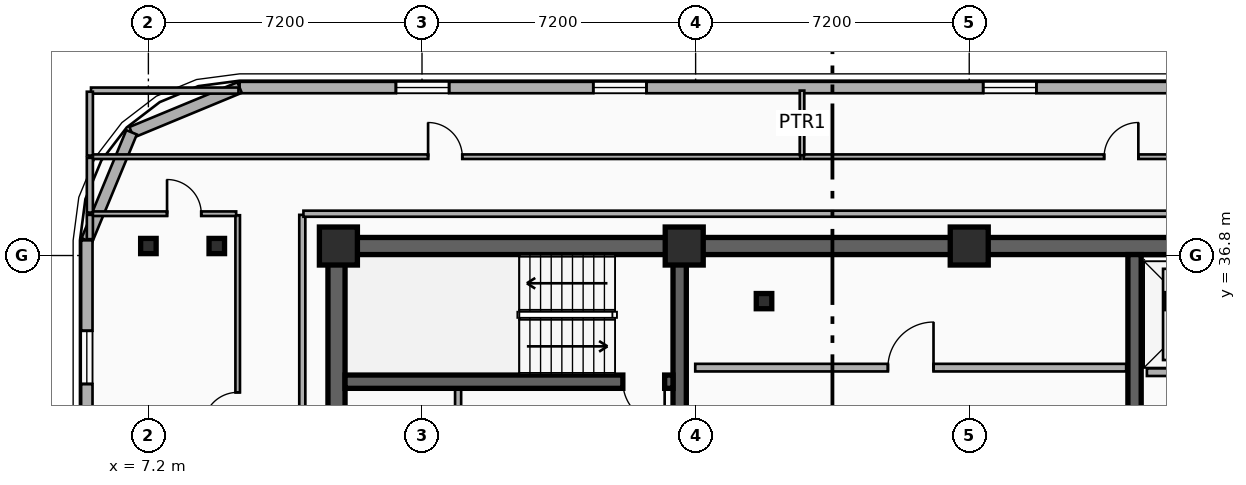
"""IFC4 building model, lengths in metres.
Left out: names, types, materials, properties, quantities, classifications, styles, units other than length and angle.
Written with IfcOpenShell. Run it as: python <this file> out.ifc"""

import sys

from ifc_helpers import new_model, si_unit, direction, frame, frame_2d, origin, origin_2d, place, context, subcontext, project, spatial, rectangle, i_section, extrude, element, fill, save


model = new_model("IFC4")
c1 = context("Model", 3, precision=1e-05, world=origin(), true_north=direction((0.0, 1.0)))
c2 = subcontext(c1, "Body", "Model", "MODEL_VIEW")
j1 = project(units=[si_unit("LENGTHUNIT", "METRE"), si_unit("PLANEANGLEUNIT", "RADIAN")], contexts=[c1])
p1 = place(None, origin())
s1 = spatial("IfcSite", under=j1, at=p1, CompositionType="ELEMENT")
p2 = place(p1, origin())
s2 = spatial("IfcBuilding", under=s1, at=p2, CompositionType="ELEMENT")
p3 = place(p2, frame((0.0, 0.0, 204.0)))
s3 = spatial("IfcBuildingStorey", under=s2, at=p3, CompositionType="ELEMENT", Elevation=204.0)
p4 = place(p3, frame((12.15, 37.05, 0.0), z_axis=(0.0, 0.0, 1.0), x_axis=(1.0, 0.0, 0.0)))
e1 = element("IfcWall", 1, at=p4, inside=s3, PredefinedType="SHEAR", context=c2, shape_type="SweptSolid", body=[
    extrude(rectangle(XDim=33.23, YDim=0.45, at=frame_2d((16.615, 0.0))), origin(), (0.0, 0.0, 1.0), 3.6),
])
p5 = place(p3, frame((12.15, 28.045, 0.0), z_axis=(0.0, 0.0, 1.0), x_axis=(0.0, 1.0, 0.0)))
e2 = element("IfcWall", 2, at=p5, inside=s3, PredefinedType="SHEAR", context=c2, shape_type="SweptSolid", body=[
    extrude(rectangle(XDim=8.78, YDim=0.45, at=frame_2d((4.39, 0.0))), origin(), (0.0, 0.0, 1.0), 3.6),
])
for number, where, z_axis, x_axis in (
    (3, (21.18, 28.045, 0.0), (0.0, 0.0, 1.0), (0.0, 1.0, 0.0)),
    (4, (33.15, 28.045, 0.0), (0.0, 0.0, 1.0), (0.0, 1.0, 0.0)),
):
    element("IfcWall", number, at=place(p3, frame(where, z_axis=z_axis, x_axis=x_axis)), inside=s3, PredefinedType="SHEAR", context=c2, shape_type="SweptSolid", body=[
        extrude(rectangle(XDim=8.78, YDim=0.35, at=frame_2d((4.39, 0.0))), origin(), (0.0, 0.0, 1.0), 3.6),
    ])
p6 = place(p3, frame((21.005, 33.48, 0.0), z_axis=(0.0, 0.0, 1.0), x_axis=(-1.0, 0.0, 0.0)))
e5 = element("IfcWall", 5, at=p6, inside=s3, PredefinedType="SHEAR", context=c2, shape_type="SweptSolid", body=[
    extrude(rectangle(XDim=8.63, YDim=0.35, at=frame_2d((4.315, 0.0))), origin(), (0.0, 0.0, 1.0), 3.6),
])
p7 = place(p6, frame((0.22, 0.0, 0.0)))
e6 = element("IfcOpeningElement", 6, at=p7, cuts=e5, PredefinedType="OPENING", context=c2, shape_type="SweptSolid", body=[
    extrude(rectangle(XDim=1.1, YDim=2.15, at=frame_2d((0.55, 1.075))), frame((0.0, 0.185, 0.0), z_axis=(0.0, -1.0, 0.0), x_axis=(1.0, 0.0, 0.0)), (0.0, 0.0, 1.0), 0.37),
])
p8 = place(p3, frame((23.4, 35.6, 0.0), z_axis=(0.0, 0.0, 1.0), x_axis=(1.0, 0.0, 0.0)))
e7 = element("IfcColumn", 7, at=p8, inside=s3, PredefinedType="COLUMN", context=c2, shape_type="SweptSolid", body=[
    extrude(i_section(OverallWidth=0.408, OverallDepth=0.4, WebThickness=0.025, FlangeThickness=0.039, FilletRadius=0.015, at=origin_2d()), origin(), (0.0, 0.0, 1.0), 3.6),
])
for number, where, z_axis, x_axis in (
    (8, (12.2, 37.05, 0.0), (0.0, 0.0, 1.0), (1.0, 0.0, 0.0)),
    (9, (21.3, 37.05, 0.0), (0.0, 0.0, 1.0), (1.0, 0.0, 0.0)),
    (10, (28.8, 37.05, 0.0), (0.0, 0.0, 1.0), (1.0, 0.0, 0.0)),
):
    element("IfcColumn", number, at=place(p3, frame(where, z_axis=z_axis, x_axis=x_axis)), inside=s3, PredefinedType="COLUMN", context=c2, shape_type="SweptSolid", body=[
        extrude(rectangle(XDim=1.0, YDim=1.0, at=origin_2d()), origin(), (0.0, 0.0, 1.0), 3.6),
    ])
for number, where, z_axis, x_axis in (
    (11, (9.0, 37.05, 0.0), (0.0, 0.0, 1.0), (1.0, 0.0, 0.0)),
    (12, (7.2, 37.05, 0.0), (0.0, 0.0, 1.0), (1.0, 0.0, 0.0)),
):
    element("IfcColumn", number, at=place(p3, frame(where, z_axis=z_axis, x_axis=x_axis)), inside=s3, PredefinedType="COLUMN", context=c2, shape_type="SweptSolid", body=[
        extrude(i_section(OverallWidth=0.408, OverallDepth=0.4, WebThickness=0.025, FlangeThickness=0.039, FilletRadius=0.015, at=origin_2d()), origin(), (0.0, 0.0, 1.0), 3.6),
    ])
p9 = place(p3, frame((9.6, 41.22, 0.0), z_axis=(0.0, 0.0, 1.0), x_axis=(1.0, 0.0, 0.0)))
e13 = element("IfcWall", 13, at=p9, inside=s3, PredefinedType="SOLIDWALL", context=c2, shape_type="SweptSolid", body=[
    extrude(rectangle(XDim=38.4, YDim=0.3, at=frame_2d((19.2, 0.0))), origin(), (0.0, 0.0, 1.0), 3.34),
])
p10 = place(p9, frame((4.113, 0.0, 0.75)))
e14 = element("IfcOpeningElement", 14, at=p10, cuts=e13, PredefinedType="OPENING", context=c2, shape_type="SweptSolid", body=[
    extrude(rectangle(XDim=1.4, YDim=2.1, at=frame_2d((0.7, 1.05))), frame((0.0, 0.16, 0.0), z_axis=(0.0, -1.0, 0.0), x_axis=(1.0, 0.0, 0.0)), (0.0, 0.0, 1.0), 0.32),
])
p11 = place(p9, frame((9.307, 0.0, 0.75)))
e15 = element("IfcOpeningElement", 15, at=p11, cuts=e13, PredefinedType="OPENING", context=c2, shape_type="SweptSolid", body=[
    extrude(rectangle(XDim=1.4, YDim=2.1, at=frame_2d((0.7, 1.05))), frame((0.0, 0.16, 0.0), z_axis=(0.0, -1.0, 0.0), x_axis=(1.0, 0.0, 0.0)), (0.0, 0.0, 1.0), 0.32),
])
p12 = place(p9, frame((19.567, 0.0, 0.75)))
e16 = element("IfcOpeningElement", 16, at=p12, cuts=e13, PredefinedType="OPENING", context=c2, shape_type="SweptSolid", body=[
    extrude(rectangle(XDim=1.4, YDim=2.1, at=frame_2d((0.7, 1.05))), frame((0.0, 0.16, 0.0), z_axis=(0.0, -1.0, 0.0), x_axis=(1.0, 0.0, 0.0)), (0.0, 0.0, 1.0), 0.32),
])
p13 = place(p9, frame((25.433, 0.0, 0.75)))
e17 = element("IfcOpeningElement", 17, at=p13, cuts=e13, PredefinedType="OPENING", context=c2, shape_type="SweptSolid", body=[
    extrude(rectangle(XDim=1.4, YDim=2.1, at=frame_2d((0.7, 1.05))), frame((0.0, 0.16, 0.0), z_axis=(0.0, -1.0, 0.0), x_axis=(1.0, 0.0, 0.0)), (0.0, 0.0, 1.0), 0.32),
])
p14 = place(p3, frame((6.757, 40.042, 0.0), z_axis=(0.0, 0.0, 1.0), x_axis=(0.923882414032, 0.382676475685, 0.0)))
e18 = element("IfcWall", 18, at=p14, inside=s3, PredefinedType="SOLIDWALL", context=c2, shape_type="SweptSolid", body=[
    extrude(rectangle(XDim=3.077, YDim=0.3, at=frame_2d((1.539, 0.0))), origin(), (0.0, 0.0, 1.0), 3.34),
])
p15 = place(p3, frame((5.58, 37.2, 0.0), z_axis=(0.0, 0.0, 1.0), x_axis=(0.382636798336, 0.92389884758, 0.0)))
e19 = element("IfcWall", 19, at=p15, inside=s3, PredefinedType="SOLIDWALL", context=c2, shape_type="SweptSolid", body=[
    extrude(rectangle(XDim=3.077, YDim=0.3, at=frame_2d((1.538, 0.0))), origin(), (0.0, 0.0, 1.0), 3.34),
])
p16 = place(p3, frame((5.58, 8.6, 0.0), z_axis=(0.0, 0.0, 1.0), x_axis=(0.0, 1.0, 0.0)))
e20 = element("IfcWall", 20, at=p16, inside=s3, PredefinedType="SOLIDWALL", context=c2, shape_type="SweptSolid", body=[
    extrude(rectangle(XDim=28.6, YDim=0.3, at=frame_2d((14.3, 0.0))), origin(), (0.0, 0.0, 1.0), 3.34),
])
p17 = place(p16, frame((21.36, 0.0, 0.34)))
e21 = element("IfcOpeningElement", 21, at=p17, cuts=e20, PredefinedType="OPENING", context=c2, shape_type="SweptSolid", body=[
    extrude(rectangle(XDim=1.4, YDim=2.1, at=frame_2d((0.7, 1.05))), frame((0.0, 0.16, 0.0), z_axis=(0.0, -1.0, 0.0), x_axis=(1.0, 0.0, 0.0)), (0.0, 0.0, 1.0), 0.32),
])
p18 = place(p16, frame((24.82, 0.0, 0.34)))
e22 = element("IfcOpeningElement", 22, at=p18, cuts=e20, PredefinedType="OPENING", context=c2, shape_type="SweptSolid", body=[
    extrude(rectangle(XDim=1.4, YDim=2.1, at=frame_2d((0.7, 1.05))), frame((0.0, 0.16, 0.0), z_axis=(0.0, -1.0, 0.0), x_axis=(1.0, 0.0, 0.0)), (0.0, 0.0, 1.0), 0.32),
])
p19 = place(p16, frame((4.797, 0.0, 0.34)))
e23 = element("IfcOpeningElement", 23, at=p19, cuts=e20, PredefinedType="OPENING", context=c2, shape_type="SweptSolid", body=[
    extrude(rectangle(XDim=1.4, YDim=2.1, at=frame_2d((0.7, 1.05))), frame((0.0, 0.16, 0.0), z_axis=(0.0, -1.0, 0.0), x_axis=(1.0, 0.0, 0.0)), (0.0, 0.0, 1.0), 0.32),
])
p20 = place(p16, frame((10.673, 0.0, 0.34)))
e24 = element("IfcOpeningElement", 24, at=p20, cuts=e20, PredefinedType="OPENING", context=c2, shape_type="SweptSolid", body=[
    extrude(rectangle(XDim=1.4, YDim=2.1, at=frame_2d((0.7, 1.05))), frame((0.0, 0.16, 0.0), z_axis=(0.0, -1.0, 0.0), x_axis=(1.0, 0.0, 0.0)), (0.0, 0.0, 1.0), 0.32),
])
p21 = place(p3, frame((33.475, 33.73, 0.0), z_axis=(0.0, 0.0, 1.0), x_axis=(1.0, 0.0, 0.0)))
e25 = element("IfcWall", 25, at=p21, inside=s3, PredefinedType="PARTITIONING", context=c2, shape_type="SweptSolid", body=[
    extrude(rectangle(XDim=2.725, YDim=0.2, at=frame_2d((1.362, 0.0))), origin(), (0.0, 0.0, 1.0), 2.41),
])
p22 = place(p21, frame((0.812, 0.0, 0.0)))
e26 = element("IfcOpeningElement", 26, at=p22, cuts=e25, PredefinedType="OPENING", context=c2, shape_type="SweptSolid", body=[
    extrude(rectangle(XDim=1.1, YDim=2.15, at=frame_2d((0.55, 1.075))), frame((0.0, 0.11, 0.0), z_axis=(0.0, -1.0, 0.0), x_axis=(1.0, 0.0, 0.0)), (0.0, 0.0, 1.0), 0.22),
])
p23 = place(p3, frame((21.59, 33.85, 0.0), z_axis=(0.0, 0.0, 1.0), x_axis=(1.0, 0.0, 0.0)))
e27 = element("IfcWall", 27, at=p23, inside=s3, PredefinedType="PARTITIONING", context=c2, shape_type="SweptSolid", body=[
    extrude(rectangle(XDim=11.34, YDim=0.2, at=frame_2d((5.67, 0.0))), origin(), (0.0, 0.0, 1.0), 2.41),
])
p24 = place(p23, frame((5.07, 0.0, 0.0)))
e28 = element("IfcOpeningElement", 28, at=p24, cuts=e27, PredefinedType="OPENING", context=c2, shape_type="SweptSolid", body=[
    extrude(rectangle(XDim=1.2, YDim=2.15, at=frame_2d((0.6, 1.075))), frame((0.0, 0.11, 0.0), z_axis=(0.0, -1.0, 0.0), x_axis=(1.0, 0.0, 0.0)), (0.0, 0.0, 1.0), 0.22),
])
p25 = place(p3, frame((9.55, 27.64, 0.0), z_axis=(0.0, 0.0, 1.0), x_axis=(0.0, 1.0, 0.0)))
e29 = element("IfcWall", 29, at=p25, inside=s3, PredefinedType="PARTITIONING", context=c2, shape_type="SweptSolid", body=[
    extrude(rectangle(XDim=10.22, YDim=0.12, at=frame_2d((5.11, 0.0))), origin(), (0.0, 0.0, 1.0), 2.82),
])
p26 = place(p25, frame((4.66, 0.0, 0.0)))
e30 = element("IfcOpeningElement", 30, at=p26, cuts=e29, PredefinedType="OPENING", context=c2, shape_type="SweptSolid", body=[
    extrude(rectangle(XDim=0.9, YDim=2.1, at=frame_2d((0.45, 1.05))), frame((0.0, 0.07, 0.0), z_axis=(0.0, -1.0, 0.0), x_axis=(1.0, 0.0, 0.0)), (0.0, 0.0, 1.0), 0.14),
])
p27 = place(p3, frame((5.66, 37.9, 0.0), z_axis=(0.0, 0.0, 1.0), x_axis=(1.0, 0.0, 0.0)))
e31 = element("IfcWall", 31, at=p27, inside=s3, PredefinedType="PARTITIONING", context=c2, shape_type="SweptSolid", body=[
    extrude(rectangle(XDim=3.85, YDim=0.12, at=frame_2d((1.925, 0.0))), origin(), (0.0, 0.0, 1.0), 3.34),
])
p28 = place(p27, frame((2.031, 0.0, 0.0)))
e32 = element("IfcOpeningElement", 32, at=p28, cuts=e31, PredefinedType="OPENING", context=c2, shape_type="SweptSolid", body=[
    extrude(rectangle(XDim=0.9, YDim=2.1, at=frame_2d((0.45, 1.05))), frame((0.0, 0.07, 0.0), z_axis=(0.0, -1.0, 0.0), x_axis=(1.0, 0.0, 0.0)), (0.0, 0.0, 1.0), 0.14),
])
p29 = place(p3, frame((5.66, 39.4, 0.0), z_axis=(0.0, 0.0, 1.0), x_axis=(1.0, 0.0, 0.0)))
e33 = element("IfcWall", 33, at=p29, inside=s3, PredefinedType="PARTITIONING", context=c2, shape_type="SweptSolid", body=[
    extrude(rectangle(XDim=18.7, YDim=0.12, at=frame_2d((9.35, 0.0))), origin(), (0.0, 0.0, 1.0), 3.34),
])
p30 = place(p29, frame((8.9, 0.0, 0.0)))
e34 = element("IfcOpeningElement", 34, at=p30, cuts=e33, PredefinedType="OPENING", context=c2, shape_type="SweptSolid", body=[
    extrude(rectangle(XDim=0.9, YDim=2.1, at=frame_2d((0.45, 1.05))), frame((0.0, 0.07, 0.0), z_axis=(0.0, -1.0, 0.0), x_axis=(1.0, 0.0, 0.0)), (0.0, 0.0, 1.0), 0.14),
])
p31 = place(p3, frame((24.44, 39.4, 0.0), z_axis=(0.0, 0.0, 1.0), x_axis=(1.0, 0.0, 0.0)))
e35 = element("IfcWall", 35, at=p31, inside=s3, PredefinedType="PARTITIONING", context=c2, shape_type="SweptSolid", body=[
    extrude(rectangle(XDim=16.72, YDim=0.12, at=frame_2d((8.36, 0.0))), origin(), (0.0, 0.0, 1.0), 3.34),
])
p32 = place(p31, frame((7.91, 0.0, 0.0)))
e36 = element("IfcOpeningElement", 36, at=p32, cuts=e35, PredefinedType="OPENING", context=c2, shape_type="SweptSolid", body=[
    extrude(rectangle(XDim=0.9, YDim=2.1, at=frame_2d((0.45, 1.05))), frame((0.0, 0.07, 0.0), z_axis=(0.0, -1.0, 0.0), x_axis=(1.0, 0.0, 0.0)), (0.0, 0.0, 1.0), 0.14),
])
p33 = place(p3, frame((24.4, 39.44, 0.0), z_axis=(0.0, 0.0, 1.0), x_axis=(0.0, 1.0, 0.0)))
e37 = element("IfcWall", 37, at=p33, inside=s3, PredefinedType="PARTITIONING", context=c2, shape_type="SweptSolid", body=[
    extrude(rectangle(XDim=1.7, YDim=0.12, at=frame_2d((0.85, 0.0))), origin(), (0.0, 0.0, 1.0), 3.34),
])
p34 = place(p3, frame((15.35, 30.96, 0.0), z_axis=(0.0, 0.0, 1.0), x_axis=(0.0, 1.0, 0.0)))
e38 = element("IfcWall", 38, at=p34, inside=s3, PredefinedType="PARTITIONING", context=c2, shape_type="SweptSolid", body=[
    extrude(rectangle(XDim=2.31, YDim=0.16, at=frame_2d((1.155, 0.0))), origin(), (0.0, 0.0, 1.0), 3.34),
])
p35 = place(p3, frame((11.25, 27.63, 0.0), z_axis=(0.0, 0.0, 1.0), x_axis=(0.0, 1.0, 0.0)))
e39 = element("IfcWall", 39, at=p35, inside=s3, PredefinedType="PARTITIONING", context=c2, shape_type="SweptSolid", body=[
    extrude(rectangle(XDim=10.24, YDim=0.16, at=frame_2d((5.12, 0.0))), origin(), (0.0, 0.0, 1.0), 2.82),
])
p36 = place(p3, frame((11.28, 37.9, 0.0), z_axis=(0.0, 0.0, 1.0), x_axis=(1.0, 0.0, 0.0)))
e40 = element("IfcWall", 40, at=p36, inside=s3, PredefinedType="PARTITIONING", context=c2, shape_type="SweptSolid", body=[
    extrude(rectangle(XDim=35.04, YDim=0.16, at=frame_2d((17.52, 0.0))), origin(), (0.0, 0.0, 1.0), 3.34),
])
p37 = place(p3, frame((5.66, 37.93, 0.0), z_axis=(0.0, 0.0, 1.0), x_axis=(0.0, 1.0, 0.0)))
e41 = element("IfcWall", 41, at=p37, inside=s3, PredefinedType="PARTITIONING", context=c2, shape_type="SweptSolid", body=[
    extrude(rectangle(XDim=1.44, YDim=0.16, at=frame_2d((0.72, 0.0))), origin(), (0.0, 0.0, 1.0), 3.34),
])
p38 = place(p3, frame((5.66, 37.23, 0.0), z_axis=(0.0, 0.0, 1.0), x_axis=(0.0, 1.0, 0.0)))
e42 = element("IfcWall", 42, at=p38, inside=s3, PredefinedType="PARTITIONING", context=c2, shape_type="SweptSolid", body=[
    extrude(rectangle(XDim=0.64, YDim=0.16, at=frame_2d((0.32, 0.0))), origin(), (0.0, 0.0, 1.0), 3.34),
])
p39 = place(p3, frame((5.69, 41.14, 0.0), z_axis=(0.0, 0.0, 1.0), x_axis=(1.0, 0.0, 0.0)))
e43 = element("IfcWall", 43, at=p39, inside=s3, PredefinedType="PARTITIONING", context=c2, shape_type="SweptSolid", body=[
    extrude(rectangle(XDim=3.88, YDim=0.16, at=frame_2d((1.94, 0.0))), origin(), (0.0, 0.0, 1.0), 3.34),
])
p40 = place(p3, frame((5.66, 39.43, 0.0), z_axis=(0.0, 0.0, 1.0), x_axis=(0.0, 1.0, 0.0)))
e44 = element("IfcWall", 44, at=p40, inside=s3, PredefinedType="PARTITIONING", context=c2, shape_type="SweptSolid", body=[
    extrude(rectangle(XDim=1.68, YDim=0.16, at=frame_2d((0.84, 0.0))), origin(), (0.0, 0.0, 1.0), 3.34),
])
p41 = place(p10, origin())
e45 = element("IfcWindow", 45, at=p41, inside=s3, PartitioningType="SINGLE_PANEL", PredefinedType="WINDOW", context=c2, shape_type="SweptSolid", body=[
    extrude(rectangle(XDim=1.4, YDim=2.1, at=frame_2d((0.7, 1.05))), frame((0.0, 0.03, 0.0), z_axis=(0.0, -1.0, 0.0), x_axis=(1.0, 0.0, 0.0)), (0.0, 0.0, 1.0), 0.06),
])
fill(e14, e45)
p42 = place(p11, origin())
e46 = element("IfcWindow", 46, at=p42, inside=s3, PartitioningType="SINGLE_PANEL", PredefinedType="WINDOW", context=c2, shape_type="SweptSolid", body=[
    extrude(rectangle(XDim=1.4, YDim=2.1, at=frame_2d((0.7, 1.05))), frame((0.0, 0.03, 0.0), z_axis=(0.0, -1.0, 0.0), x_axis=(1.0, 0.0, 0.0)), (0.0, 0.0, 1.0), 0.06),
])
fill(e15, e46)
p43 = place(p12, origin())
e47 = element("IfcWindow", 47, at=p43, inside=s3, PartitioningType="SINGLE_PANEL", PredefinedType="WINDOW", context=c2, shape_type="SweptSolid", body=[
    extrude(rectangle(XDim=1.4, YDim=2.1, at=frame_2d((0.7, 1.05))), frame((0.0, 0.03, 0.0), z_axis=(0.0, -1.0, 0.0), x_axis=(1.0, 0.0, 0.0)), (0.0, 0.0, 1.0), 0.06),
])
fill(e16, e47)
p44 = place(p18, origin())
e48 = element("IfcWindow", 48, at=p44, inside=s3, PartitioningType="SINGLE_PANEL", PredefinedType="WINDOW", context=c2, shape_type="SweptSolid", body=[
    extrude(rectangle(XDim=1.4, YDim=2.1, at=frame_2d((0.7, 1.05))), frame((0.0, 0.03, 0.0), z_axis=(0.0, -1.0, 0.0), x_axis=(1.0, 0.0, 0.0)), (0.0, 0.0, 1.0), 0.06),
])
fill(e22, e48)
p45 = place(p7, origin())
e49 = element("IfcDoor", 49, at=p45, inside=s3, OperationType="SINGLE_SWING_LEFT", PredefinedType="DOOR", context=c2, shape_type="SweptSolid", body=[
    extrude(rectangle(XDim=1.1, YDim=2.15, at=frame_2d((0.55, 1.075))), frame((0.0, 0.025, 0.0), z_axis=(0.0, -1.0, 0.0), x_axis=(1.0, 0.0, 0.0)), (0.0, 0.0, 1.0), 0.05),
])
fill(e6, e49)
p46 = place(p24, origin())
e50 = element("IfcDoor", 50, at=p46, inside=s3, OperationType="SINGLE_SWING_RIGHT", PredefinedType="DOOR", context=c2, shape_type="SweptSolid", body=[
    extrude(rectangle(XDim=1.2, YDim=2.15, at=frame_2d((0.6, 1.075))), frame((0.0, 0.025, 0.0), z_axis=(0.0, -1.0, 0.0), x_axis=(1.0, 0.0, 0.0)), (0.0, 0.0, 1.0), 0.05),
])
fill(e28, e50)
p47 = place(p26, origin())
e51 = element("IfcDoor", 51, at=p47, inside=s3, OperationType="SINGLE_SWING_LEFT", PredefinedType="DOOR", context=c2, shape_type="SweptSolid", body=[
    extrude(rectangle(XDim=0.9, YDim=2.1, at=frame_2d((0.45, 1.05))), frame((0.0, 0.025, 0.0), z_axis=(0.0, -1.0, 0.0), x_axis=(1.0, 0.0, 0.0)), (0.0, 0.0, 1.0), 0.05),
])
fill(e30, e51)
p48 = place(p28, origin())
e52 = element("IfcDoor", 52, at=p48, inside=s3, OperationType="SINGLE_SWING_LEFT", PredefinedType="DOOR", context=c2, shape_type="SweptSolid", body=[
    extrude(rectangle(XDim=0.9, YDim=2.1, at=frame_2d((0.45, 1.05))), frame((0.0, 0.025, 0.0), z_axis=(0.0, -1.0, 0.0), x_axis=(1.0, 0.0, 0.0)), (0.0, 0.0, 1.0), 0.05),
])
fill(e32, e52)
p49 = place(p30, origin())
e53 = element("IfcDoor", 53, at=p49, inside=s3, OperationType="SINGLE_SWING_LEFT", PredefinedType="DOOR", context=c2, shape_type="SweptSolid", body=[
    extrude(rectangle(XDim=0.9, YDim=2.1, at=frame_2d((0.45, 1.05))), frame((0.0, 0.025, 0.0), z_axis=(0.0, -1.0, 0.0), x_axis=(1.0, 0.0, 0.0)), (0.0, 0.0, 1.0), 0.05),
])
fill(e34, e53)
p50 = place(p32, origin())
e54 = element("IfcDoor", 54, at=p50, inside=s3, OperationType="SINGLE_SWING_RIGHT", PredefinedType="DOOR", context=c2, shape_type="SweptSolid", body=[
    extrude(rectangle(XDim=0.9, YDim=2.1, at=frame_2d((0.45, 1.05))), frame((0.0, 0.025, 0.0), z_axis=(0.0, -1.0, 0.0), x_axis=(1.0, 0.0, 0.0)), (0.0, 0.0, 1.0), 0.05),
])
fill(e36, e54)
save(model, sys.argv[1])
